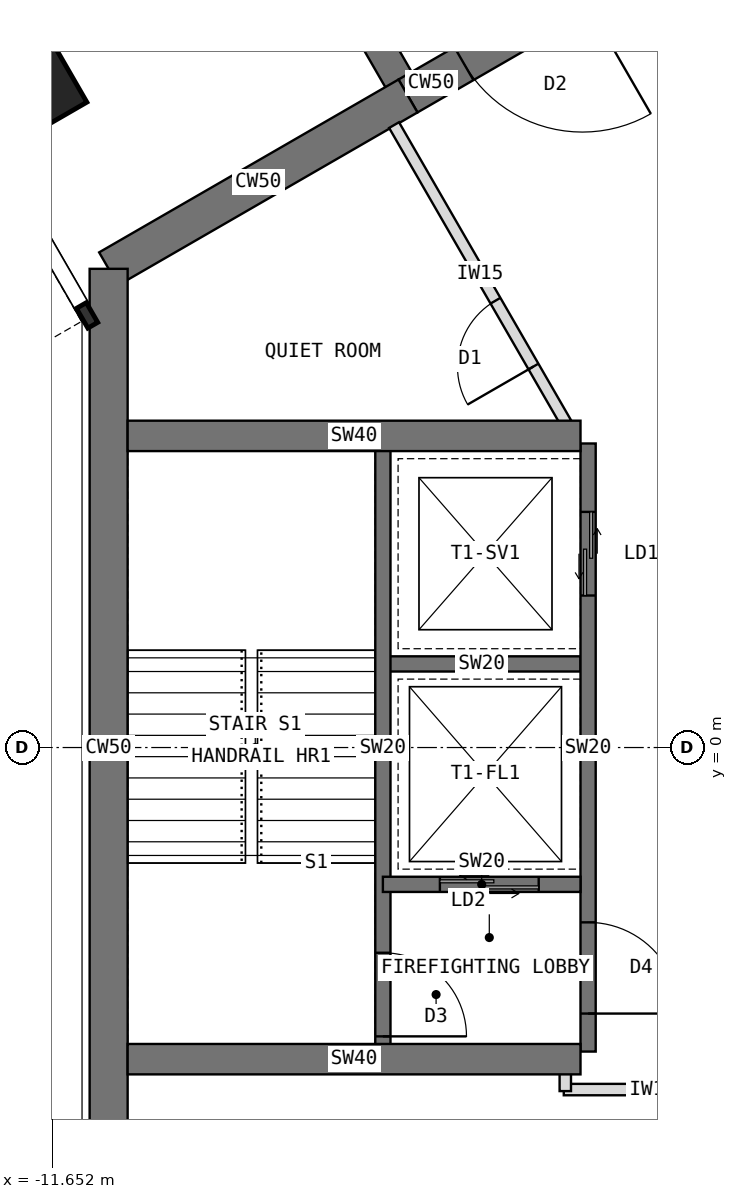
"""IFC4 building model, lengths in metres.
Left out: names, types, materials, properties, quantities, classifications, styles, units other than length and angle.
Written with IfcOpenShell. Run it as: python <this file> out.ifc"""

import sys

from ifc_helpers import new_model, si_unit, direction, frame, frame_2d, origin, origin_2d, place, context, subcontext, project, spatial, rectangle, extrude, element, fill, save


model = new_model("IFC4")
c1 = context("Model", 3, precision=1e-05, world=origin(), true_north=direction((0.0, 1.0)))
c2 = subcontext(c1, "Body", "Model", "MODEL_VIEW")
j1 = project(units=[si_unit("LENGTHUNIT", "METRE"), si_unit("PLANEANGLEUNIT", "RADIAN")], contexts=[c1])
p1 = place(None, origin())
s1 = spatial("IfcSite", under=j1, at=p1, CompositionType="ELEMENT")
p2 = place(p1, origin())
s2 = spatial("IfcBuilding", under=s1, at=p2, CompositionType="ELEMENT")
p3 = place(p2, frame((0.0, 0.0, 234.5)))
s3 = spatial("IfcBuildingStorey", under=s2, at=p3, CompositionType="ELEMENT", Elevation=234.5)
p4 = place(p3, frame((-3.939, 10.322, 0.0), z_axis=(0.0, 0.0, 1.0), x_axis=(-0.866019471182, -0.500010275428, 0.0)))
e1 = element("IfcWall", 1, at=p4, inside=s3, PredefinedType="SHEAR", context=c2, shape_type="SweptSolid", body=[
    extrude(rectangle(XDim=3.5, YDim=0.5, at=frame_2d((1.75, 0.0))), origin(), (0.0, 0.0, 1.0), 4.0),
])
p5 = place(p4, frame((0.85, 0.0, 0.0)))
e2 = element("IfcOpeningElement", 2, at=p5, cuts=e1, PredefinedType="OPENING", context=c2, shape_type="SweptSolid", body=[
    extrude(rectangle(XDim=1.8, YDim=2.1, at=frame_2d((0.9, 1.05))), frame((0.0, 0.26, 0.0), z_axis=(0.0, -1.0, 0.0), x_axis=(1.0, 0.0, 0.0)), (0.0, 0.0, 1.0), 0.52),
])
p6 = place(p3, frame((-6.97, 8.572, 0.0), z_axis=(0.0, 0.0, 1.0), x_axis=(-0.866034513004, -0.499984222037, 0.0)))
e3 = element("IfcWall", 3, at=p6, inside=s3, PredefinedType="SHEAR", context=c2, shape_type="SweptSolid", body=[
    extrude(rectangle(XDim=4.548, YDim=0.5, at=frame_2d((2.274, 0.0))), origin(), (0.0, 0.0, 1.0), 4.0),
])
p7 = place(p3, frame((-10.908, 6.298, 0.0), z_axis=(0.0, 0.0, 1.0), x_axis=(0.0, -1.0, 0.0)))
e4 = element("IfcWall", 4, at=p7, inside=s3, PredefinedType="SHEAR", context=c2, shape_type="SweptSolid", body=[
    extrude(rectangle(XDim=12.596, YDim=0.5, at=frame_2d((6.298, 0.0))), origin(), (0.0, 0.0, 1.0), 4.0),
])
p8 = place(p3, frame((-6.97, 8.572, 0.0), z_axis=(0.0, 0.0, 1.0), x_axis=(-0.499988811324, 0.866031863473, 0.0)))
e5 = element("IfcWall", 5, at=p8, inside=s3, PredefinedType="SHEAR", context=c2, shape_type="SweptSolid", body=[
    extrude(rectangle(XDim=2.592, YDim=0.4, at=frame_2d((1.296, 0.0))), origin(), (0.0, 0.0, 1.0), 4.0),
])
p9 = place(p3, frame((-11.946, 8.691, 0.0), z_axis=(0.0, 0.0, 1.0), x_axis=(0.866025403784, 0.5, 0.0)))
e6 = element("IfcColumn", 6, at=p9, inside=s3, PredefinedType="COLUMN", context=c2, shape_type="SweptSolid", body=[
    extrude(rectangle(XDim=1.1, YDim=1.1, at=origin_2d()), origin(), (0.0, 0.0, 1.0), 4.0),
])
p10 = place(p3, frame((-4.6, 4.0, 0.0), z_axis=(0.0, 0.0, 1.0), x_axis=(0.0, -1.0, 0.0)))
e7 = element("IfcWall", 7, at=p10, inside=s3, PredefinedType="SHEAR", context=c2, shape_type="SweptSolid", body=[
    extrude(rectangle(XDim=8.0, YDim=0.2, at=frame_2d((4.0, 0.0))), origin(), (0.0, 0.0, 1.0), 4.0),
])
p11 = place(p10, frame((6.3, 0.0, 0.0)))
e8 = element("IfcOpeningElement", 8, at=p11, cuts=e7, PredefinedType="OPENING", context=c2, shape_type="SweptSolid", body=[
    extrude(rectangle(XDim=1.2, YDim=2.1, at=frame_2d((0.6, 1.05))), frame((0.0, 0.11, 0.0), z_axis=(0.0, -1.0, 0.0), x_axis=(1.0, 0.0, 0.0)), (0.0, 0.0, 1.0), 0.22),
])
p12 = place(p10, frame((0.9, 0.0, 0.0)))
e9 = element("IfcOpeningElement", 9, at=p12, cuts=e7, PredefinedType="OPENING", context=c2, shape_type="SweptSolid", body=[
    extrude(rectangle(XDim=1.1, YDim=2.2, at=frame_2d((0.55, 1.1))), frame((0.0, 0.11, 0.0), z_axis=(0.0, -1.0, 0.0), x_axis=(1.0, 0.0, 0.0)), (0.0, 0.0, 1.0), 0.22),
])
p13 = place(p3, frame((-4.7, 1.1, 0.0), z_axis=(0.0, 0.0, 1.0), x_axis=(-1.0, 0.0, 0.0)))
e10 = element("IfcWall", 10, at=p13, inside=s3, PredefinedType="SHEAR", context=c2, shape_type="SweptSolid", body=[
    extrude(rectangle(XDim=2.6, YDim=0.2, at=frame_2d((1.3, 0.0))), origin(), (0.0, 0.0, 1.0), 4.0),
])
p14 = place(p3, frame((-4.7, -1.8, 0.0), z_axis=(0.0, 0.0, 1.0), x_axis=(-1.0, 0.0, 0.0)))
e11 = element("IfcWall", 11, at=p14, inside=s3, PredefinedType="SHEAR", context=c2, shape_type="SweptSolid", body=[
    extrude(rectangle(XDim=2.6, YDim=0.2, at=frame_2d((1.3, 0.0))), origin(), (0.0, 0.0, 1.0), 4.0),
])
p15 = place(p14, frame((0.55, 0.0, 0.0)))
e12 = element("IfcOpeningElement", 12, at=p15, cuts=e11, PredefinedType="OPENING", context=c2, shape_type="SweptSolid", body=[
    extrude(rectangle(XDim=1.3, YDim=2.2, at=frame_2d((0.65, 1.1))), frame((0.0, 0.11, 0.0), z_axis=(0.0, -1.0, 0.0), x_axis=(1.0, 0.0, 0.0)), (0.0, 0.0, 1.0), 0.22),
])
p16 = place(p3, frame((-7.3, 4.0, 0.0), z_axis=(0.0, 0.0, 1.0), x_axis=(0.0, -1.0, 0.0)))
e13 = element("IfcWall", 13, at=p16, inside=s3, PredefinedType="SHEAR", context=c2, shape_type="SweptSolid", body=[
    extrude(rectangle(XDim=8.0, YDim=0.2, at=frame_2d((4.0, 0.0))), origin(), (0.0, 0.0, 1.0), 4.0),
])
p17 = place(p16, frame((6.7, 0.0, 0.0)))
e14 = element("IfcOpeningElement", 14, at=p17, cuts=e13, PredefinedType="OPENING", context=c2, shape_type="SweptSolid", body=[
    extrude(rectangle(XDim=1.1, YDim=2.1, at=frame_2d((0.55, 1.05))), frame((0.0, 0.11, 0.0), z_axis=(0.0, -1.0, 0.0), x_axis=(1.0, 0.0, 0.0)), (0.0, 0.0, 1.0), 0.22),
])
for number, where, z_axis, x_axis in (
    (15, (-4.7, -4.1, 0.0), (0.0, 0.0, 1.0), (-1.0, 0.0, 0.0)),
    (16, (-4.7, 4.1, 0.0), (0.0, 0.0, 1.0), (-1.0, 0.0, 0.0)),
):
    element("IfcWall", number, at=place(p3, frame(where, z_axis=z_axis, x_axis=x_axis)), inside=s3, PredefinedType="SHEAR", context=c2, shape_type="SweptSolid", body=[
        extrude(rectangle(XDim=5.958, YDim=0.4, at=frame_2d((2.979, 0.0))), origin(), (0.0, 0.0, 1.0), 4.0),
    ])
p18 = place(p3, frame((-2.578, -4.5, 0.0), z_axis=(0.0, 0.0, 1.0), x_axis=(-1.0, 0.0, 0.0)))
e17 = element("IfcWall", 17, at=p18, inside=s3, PredefinedType="PARTITIONING", context=c2, shape_type="SweptSolid", body=[
    extrude(rectangle(XDim=2.342, YDim=0.15, at=frame_2d((1.171, 0.0))), origin(), (0.0, 0.0, 1.0), 3.7),
])
p19 = place(p3, frame((-4.9, -4.52, 0.0), z_axis=(0.0, 0.0, 1.0), x_axis=(0.0, 1.0, 0.0)))
e18 = element("IfcWall", 18, at=p19, inside=s3, PredefinedType="PARTITIONING", context=c2, shape_type="SweptSolid", body=[
    extrude(rectangle(XDim=0.43, YDim=0.15, at=frame_2d((0.215, 0.0))), origin(), (0.0, 0.0, 1.0), 3.7),
])
p20 = place(p3, frame((-4.89, 4.27, 0.0), z_axis=(0.0, 0.0, 1.0), x_axis=(-0.500032211057, 0.866006805923, 0.0)))
e19 = element("IfcWall", 19, at=p20, inside=s3, PredefinedType="PARTITIONING", context=c2, shape_type="SweptSolid", body=[
    extrude(rectangle(XDim=4.526, YDim=0.15, at=frame_2d((2.263, 0.0))), origin(), (0.0, 0.0, 1.0), 3.7),
])
p21 = place(p20, frame((0.858, 0.0, 0.0)))
e20 = element("IfcOpeningElement", 20, at=p21, cuts=e19, PredefinedType="OPENING", context=c2, shape_type="SweptSolid", body=[
    extrude(rectangle(XDim=1.0, YDim=2.1, at=frame_2d((0.5, 1.05))), frame((0.0, 0.085, 0.0), z_axis=(0.0, -1.0, 0.0), x_axis=(1.0, 0.0, 0.0)), (0.0, 0.0, 1.0), 0.17),
])
p22 = place(p11, origin())
e21 = element("IfcDoor", 21, at=p22, inside=s3, OperationType="SINGLE_SWING_RIGHT", PredefinedType="DOOR", context=c2, shape_type="SweptSolid", body=[
    extrude(rectangle(XDim=1.2, YDim=2.1, at=frame_2d((0.6, 1.05))), frame((0.0, 0.025, 0.0), z_axis=(0.0, -1.0, 0.0), x_axis=(1.0, 0.0, 0.0)), (0.0, 0.0, 1.0), 0.05),
])
fill(e8, e21)
p23 = place(p15, origin())
e22 = element("IfcDoor", 22, at=p23, inside=s3, OperationType="DOUBLE_DOOR_SLIDING", PredefinedType="DOOR", context=c2, shape_type="SweptSolid", body=[
    extrude(rectangle(XDim=1.3, YDim=2.2, at=frame_2d((0.65, 1.1))), frame((0.0, 0.025, 0.0), z_axis=(0.0, -1.0, 0.0), x_axis=(1.0, 0.0, 0.0)), (0.0, 0.0, 1.0), 0.05),
])
fill(e12, e22)
p24 = place(p12, origin())
e23 = element("IfcDoor", 23, at=p24, inside=s3, OperationType="DOUBLE_DOOR_SLIDING", PredefinedType="DOOR", context=c2, shape_type="SweptSolid", body=[
    extrude(rectangle(XDim=1.1, YDim=2.2, at=frame_2d((0.55, 1.1))), frame((0.0, 0.025, 0.0), z_axis=(0.0, -1.0, 0.0), x_axis=(1.0, 0.0, 0.0)), (0.0, 0.0, 1.0), 0.05),
])
fill(e9, e23)
p25 = place(p17, origin())
e24 = element("IfcDoor", 24, at=p25, inside=s3, OperationType="SINGLE_SWING_RIGHT", PredefinedType="DOOR", context=c2, shape_type="SweptSolid", body=[
    extrude(rectangle(XDim=1.1, YDim=2.1, at=frame_2d((0.55, 1.05))), frame((0.0, 0.025, 0.0), z_axis=(0.0, -1.0, 0.0), x_axis=(1.0, 0.0, 0.0)), (0.0, 0.0, 1.0), 0.05),
])
fill(e14, e24)
p26 = place(p5, origin())
e25 = element("IfcDoor", 25, at=p26, inside=s3, OperationType="DOUBLE_DOOR_DOUBLE_SWING", PredefinedType="DOOR", context=c2, shape_type="SweptSolid", body=[
    extrude(rectangle(XDim=1.8, YDim=2.1, at=frame_2d((0.9, 1.05))), frame((0.0, 0.025, 0.0), z_axis=(0.0, -1.0, 0.0), x_axis=(1.0, 0.0, 0.0)), (0.0, 0.0, 1.0), 0.05),
])
fill(e2, e25)
p27 = place(p21, origin())
e26 = element("IfcDoor", 26, at=p27, inside=s3, OperationType="SINGLE_SWING_LEFT", PredefinedType="DOOR", context=c2, shape_type="SweptSolid", body=[
    extrude(rectangle(XDim=1.0, YDim=2.1, at=frame_2d((0.5, 1.05))), frame((0.0, 0.025, 0.0), z_axis=(0.0, -1.0, 0.0), x_axis=(1.0, 0.0, 0.0)), (0.0, 0.0, 1.0), 0.05),
])
fill(e20, e26)
save(model, sys.argv[1])
